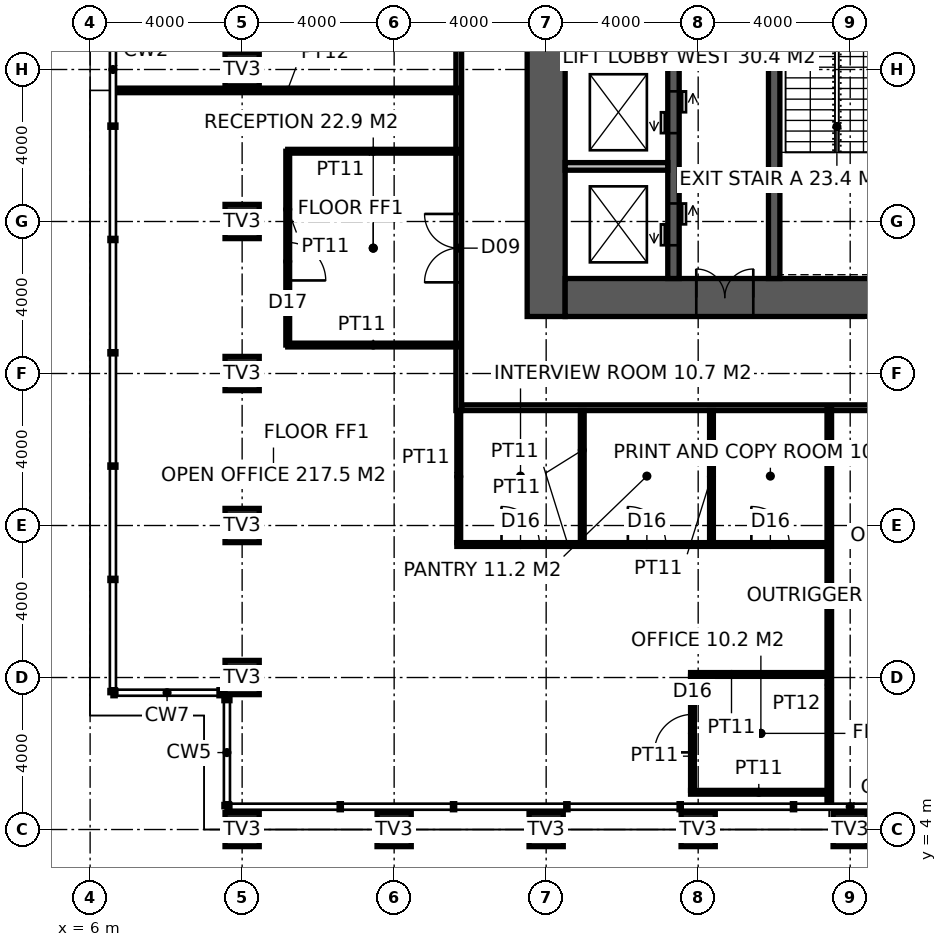
"""IFC4 building model, lengths in metres.
Left out: names, types, materials, properties, quantities, classifications, styles, units other than length and angle.
Written with IfcOpenShell. Run it as: python <this file> out.ifc"""

import sys

from ifc_helpers import new_model, si_unit, direction, frame, frame_2d, origin, origin_2d, place, context, subcontext, project, spatial, rectangle, hollow_rectangle, extrude, element, fill, save


model = new_model("IFC4")
c1 = context("Model", 3, precision=1e-05, world=origin(), true_north=direction((0.0, 1.0)))
c2 = subcontext(c1, "Body", "Model", "MODEL_VIEW")
j1 = project(units=[si_unit("LENGTHUNIT", "METRE"), si_unit("PLANEANGLEUNIT", "RADIAN")], contexts=[c1])
p1 = place(None, origin())
s1 = spatial("IfcSite", under=j1, at=p1, CompositionType="ELEMENT")
p2 = place(p1, origin())
s2 = spatial("IfcBuilding", under=s1, at=p2, CompositionType="ELEMENT")
p3 = place(p2, frame((0.0, 0.0, 270.2)))
s3 = spatial("IfcBuildingStorey", under=s2, at=p3, CompositionType="ELEMENT", Elevation=270.2)
for number, where, z_axis, x_axis in (
    (1, (10.0, 4.0, 0.0), (0.0, 0.0, 1.0), (1.0, 0.0, 0.0)),
    (2, (14.0, 4.0, 0.0), (0.0, 0.0, 1.0), (1.0, 0.0, 0.0)),
    (3, (18.0, 4.0, 0.0), (0.0, 0.0, 1.0), (1.0, 0.0, 0.0)),
    (4, (22.0, 4.0, 0.0), (0.0, 0.0, 1.0), (1.0, 0.0, 0.0)),
    (5, (26.0, 4.0, 0.0), (0.0, 0.0, 1.0), (1.0, 0.0, 0.0)),
    (6, (10.0, 8.0, 0.0), (0.0, 0.0, 1.0), (1.0, 0.0, 0.0)),
    (7, (10.0, 12.0, 0.0), (0.0, 0.0, 1.0), (1.0, 0.0, 0.0)),
    (8, (10.0, 16.0, 0.0), (0.0, 0.0, 1.0), (1.0, 0.0, 0.0)),
    (9, (10.0, 20.0, 0.0), (0.0, 0.0, 1.0), (1.0, 0.0, 0.0)),
    (10, (10.0, 24.0, 0.0), (0.0, 0.0, 1.0), (1.0, 0.0, 0.0)),
):
    element("IfcColumn", number, at=place(p3, frame(where, z_axis=z_axis, x_axis=x_axis)), inside=s3, PredefinedType="USERDEFINED", context=c2, shape_type="SweptSolid", body=[
        extrude(hollow_rectangle(XDim=0.9, YDim=0.9, WallThickness=0.08, at=origin_2d()), origin(), (0.0, 0.0, 1.0), 4.0),
    ])
p4 = place(p3, frame((18.0, 17.5, -0.15), z_axis=(0.0, 0.0, 1.0), x_axis=(0.0, 1.0, 0.0)))
e11 = element("IfcWall", 11, at=p4, inside=s3, PredefinedType="SHEAR", context=c2, shape_type="SweptSolid", body=[
    extrude(rectangle(XDim=19.0, YDim=1.0, at=frame_2d((9.5, 0.0))), origin(), (0.0, 0.0, 1.0), 4.0),
])
p5 = place(p3, frame((18.5, 18.0, -0.15), z_axis=(0.0, 0.0, 1.0), x_axis=(1.0, 0.0, 0.0)))
e12 = element("IfcWall", 12, at=p5, inside=s3, PredefinedType="SHEAR", context=c2, shape_type="SweptSolid", body=[
    extrude(rectangle(XDim=17.6, YDim=1.0, at=frame_2d((8.8, 0.0))), origin(), (0.0, 0.0, 1.0), 4.0),
])
p6 = place(p5, frame((3.45, 0.0, 0.15)))
e13 = element("IfcOpeningElement", 13, at=p6, cuts=e12, PredefinedType="OPENING", context=c2, shape_type="SweptSolid", body=[
    extrude(rectangle(XDim=1.5, YDim=2.4, at=frame_2d((0.75, 1.2))), frame((0.0, 0.51, 0.0), z_axis=(0.0, -1.0, 0.0), x_axis=(1.0, 0.0, 0.0)), (0.0, 0.0, 1.0), 1.02),
])
p7 = place(p3, frame((24.0, 18.5, -0.15), z_axis=(0.0, 0.0, 1.0), x_axis=(0.0, 1.0, 0.0)))
e14 = element("IfcWall", 14, at=p7, inside=s3, PredefinedType="SHEAR", context=c2, shape_type="SweptSolid", body=[
    extrude(rectangle(XDim=17.0, YDim=0.3, at=frame_2d((8.5, 0.0))), origin(), (0.0, 0.0, 1.0), 4.0),
])
p8 = place(p7, frame((9.6, 0.0, 0.15)))
e15 = element("IfcOpeningElement", 15, at=p8, cuts=e14, PredefinedType="OPENING", context=c2, shape_type="SweptSolid", body=[
    extrude(rectangle(XDim=1.5, YDim=2.4, at=frame_2d((0.75, 1.2))), frame((0.0, 0.16, 0.0), z_axis=(0.0, -1.0, 0.0), x_axis=(1.0, 0.0, 0.0)), (0.0, 0.0, 1.0), 0.32),
])
p9 = place(p3, frame((21.35, 18.5, -0.15), z_axis=(0.0, 0.0, 1.0), x_axis=(0.0, 1.0, 0.0)))
e16 = element("IfcWall", 16, at=p9, inside=s3, PredefinedType="SHEAR", context=c2, shape_type="SweptSolid", body=[
    extrude(rectangle(XDim=12.5, YDim=0.3, at=frame_2d((6.25, 0.0))), origin(), (0.0, 0.0, 1.0), 4.0),
])
p10 = place(p9, frame((0.875, 0.0, 0.15)))
e17 = element("IfcOpeningElement", 17, at=p10, cuts=e16, PredefinedType="OPENING", context=c2, shape_type="SweptSolid", body=[
    extrude(rectangle(XDim=1.1, YDim=2.2, at=frame_2d((0.55, 1.1))), frame((0.0, 0.16, 0.0), z_axis=(0.0, -1.0, 0.0), x_axis=(1.0, 0.0, 0.0)), (0.0, 0.0, 1.0), 0.32),
])
p11 = place(p9, frame((3.825, 0.0, 0.15)))
e18 = element("IfcOpeningElement", 18, at=p11, cuts=e16, PredefinedType="OPENING", context=c2, shape_type="SweptSolid", body=[
    extrude(rectangle(XDim=1.1, YDim=2.2, at=frame_2d((0.55, 1.1))), frame((0.0, 0.16, 0.0), z_axis=(0.0, -1.0, 0.0), x_axis=(1.0, 0.0, 0.0)), (0.0, 0.0, 1.0), 0.32),
])
p12 = place(p9, frame((6.675, 0.0, 0.15)))
e19 = element("IfcOpeningElement", 19, at=p12, cuts=e16, PredefinedType="OPENING", context=c2, shape_type="SweptSolid", body=[
    extrude(rectangle(XDim=1.1, YDim=2.2, at=frame_2d((0.55, 1.1))), frame((0.0, 0.16, 0.0), z_axis=(0.0, -1.0, 0.0), x_axis=(1.0, 0.0, 0.0)), (0.0, 0.0, 1.0), 0.32),
])
p13 = place(p9, frame((9.575, 0.0, 0.15)))
e20 = element("IfcOpeningElement", 20, at=p13, cuts=e16, PredefinedType="OPENING", context=c2, shape_type="SweptSolid", body=[
    extrude(rectangle(XDim=1.1, YDim=2.2, at=frame_2d((0.55, 1.1))), frame((0.0, 0.16, 0.0), z_axis=(0.0, -1.0, 0.0), x_axis=(1.0, 0.0, 0.0)), (0.0, 0.0, 1.0), 0.32),
])
for number, where, z_axis, x_axis in (
    (21, (18.5, 21.45, -0.15), (0.0, 0.0, 1.0), (1.0, 0.0, 0.0)),
    (22, (18.5, 24.3, -0.15), (0.0, 0.0, 1.0), (1.0, 0.0, 0.0)),
):
    element("IfcWall", number, at=place(p3, frame(where, z_axis=z_axis, x_axis=x_axis)), inside=s3, PredefinedType="SOLIDWALL", context=c2, shape_type="SweptSolid", body=[
        extrude(rectangle(XDim=2.7, YDim=0.2, at=frame_2d((1.35, 0.0))), origin(), (0.0, 0.0, 1.0), 4.0),
    ])
p14 = place(p3, frame((15.7, 15.025, 0.0), z_axis=(0.0, 0.0, 1.0), x_axis=(0.0, 1.0, 0.0)))
e23 = element("IfcWall", 23, at=p14, inside=s3, PredefinedType="PARTITIONING", context=c2, shape_type="SweptSolid", body=[
    extrude(rectangle(XDim=23.35, YDim=0.15, at=frame_2d((11.675, 0.0))), origin(), (0.0, 0.0, 1.0), 3.85),
])
p15 = place(p14, frame((3.374, 0.0, 0.0)))
e24 = element("IfcOpeningElement", 24, at=p15, cuts=e23, PredefinedType="OPENING", context=c2, shape_type="SweptSolid", body=[
    extrude(rectangle(XDim=1.8, YDim=2.4, at=frame_2d((0.9, 1.2))), frame((0.0, 0.085, 0.0), z_axis=(0.0, -1.0, 0.0), x_axis=(1.0, 0.0, 0.0)), (0.0, 0.0, 1.0), 0.17),
])
p16 = place(p14, frame((17.476, 0.0, 0.0)))
e25 = element("IfcOpeningElement", 25, at=p16, cuts=e23, PredefinedType="OPENING", context=c2, shape_type="SweptSolid", body=[
    extrude(rectangle(XDim=1.8, YDim=2.4, at=frame_2d((0.9, 1.2))), frame((0.0, 0.085, 0.0), z_axis=(0.0, -1.0, 0.0), x_axis=(1.0, 0.0, 0.0)), (0.0, 0.0, 1.0), 0.17),
])
p17 = place(p14, frame((10.475, 0.0, 0.0)))
e26 = element("IfcOpeningElement", 26, at=p17, cuts=e23, PredefinedType="OPENING", context=c2, shape_type="SweptSolid", body=[
    extrude(rectangle(XDim=1.0, YDim=2.2, at=frame_2d((0.5, 1.1))), frame((0.0, 0.085, 0.0), z_axis=(0.0, -1.0, 0.0), x_axis=(1.0, 0.0, 0.0)), (0.0, 0.0, 1.0), 0.17),
])
p18 = place(p3, frame((15.775, 15.1, 0.0), z_axis=(0.0, 0.0, 1.0), x_axis=(1.0, 0.0, 0.0)))
e27 = element("IfcWall", 27, at=p18, inside=s3, PredefinedType="PARTITIONING", context=c2, shape_type="SweptSolid", body=[
    extrude(rectangle(XDim=22.65, YDim=0.15, at=frame_2d((11.325, 0.0))), origin(), (0.0, 0.0, 1.0), 3.85),
])
p19 = place(p18, frame((11.725, 0.0, 0.0)))
e28 = element("IfcOpeningElement", 28, at=p19, cuts=e27, PredefinedType="OPENING", context=c2, shape_type="SweptSolid", body=[
    extrude(rectangle(XDim=1.0, YDim=2.2, at=frame_2d((0.5, 1.1))), frame((0.0, 0.085, 0.0), z_axis=(0.0, -1.0, 0.0), x_axis=(1.0, 0.0, 0.0)), (0.0, 0.0, 1.0), 0.17),
])
p20 = place(p3, frame((25.45, 4.68, 0.0), z_axis=(0.0, 0.0, 1.0), x_axis=(0.0, 1.0, 0.0)))
e29 = element("IfcWall", 29, at=p20, inside=s3, PredefinedType="PARTITIONING", context=c2, shape_type="SweptSolid", body=[
    extrude(rectangle(XDim=10.42, YDim=0.12, at=frame_2d((5.21, 0.0))), origin(), (0.0, 0.0, 1.0), 2.65),
])
p21 = place(p3, frame((6.68, 23.45, 0.0), z_axis=(0.0, 0.0, 1.0), x_axis=(1.0, 0.0, 0.0)))
e30 = element("IfcWall", 30, at=p21, inside=s3, PredefinedType="PARTITIONING", context=c2, shape_type="SweptSolid", body=[
    extrude(rectangle(XDim=9.02, YDim=0.12, at=frame_2d((4.51, 0.0))), origin(), (0.0, 0.0, 1.0), 3.85),
])
for number, where, z_axis, x_axis in (
    (31, (21.8, 4.98, 0.0), (0.0, 0.0, 1.0), (1.0, 0.0, 0.0)),
    (32, (21.8, 8.08, 0.0), (0.0, 0.0, 1.0), (1.0, 0.0, 0.0)),
):
    element("IfcWall", number, at=place(p3, frame(where, z_axis=z_axis, x_axis=x_axis)), inside=s3, PredefinedType="PARTITIONING", context=c2, shape_type="SweptSolid", body=[
        extrude(rectangle(XDim=3.59, YDim=0.1, at=frame_2d((1.795, 0.0))), origin(), (0.0, 0.0, 1.0), 3.85),
    ])
p22 = place(p3, frame((15.65, 11.5, 0.0), z_axis=(0.0, 0.0, 1.0), x_axis=(1.0, 0.0, 0.0)))
e33 = element("IfcWall", 33, at=p22, inside=s3, PredefinedType="PARTITIONING", context=c2, shape_type="SweptSolid", body=[
    extrude(rectangle(XDim=9.739, YDim=0.1, at=frame_2d((4.87, 0.0))), origin(), (0.0, 0.0, 1.0), 3.85),
])
p23 = place(p22, frame((1.175, 0.0, 0.0)))
e34 = element("IfcOpeningElement", 34, at=p23, cuts=e33, PredefinedType="OPENING", context=c2, shape_type="SweptSolid", body=[
    extrude(rectangle(XDim=1.0, YDim=2.2, at=frame_2d((0.5, 1.1))), frame((0.0, 0.06, 0.0), z_axis=(0.0, -1.0, 0.0), x_axis=(1.0, 0.0, 0.0)), (0.0, 0.0, 1.0), 0.12),
])
p24 = place(p22, frame((4.5, 0.0, 0.0)))
e35 = element("IfcOpeningElement", 35, at=p24, cuts=e33, PredefinedType="OPENING", context=c2, shape_type="SweptSolid", body=[
    extrude(rectangle(XDim=1.0, YDim=2.2, at=frame_2d((0.5, 1.1))), frame((0.0, 0.06, 0.0), z_axis=(0.0, -1.0, 0.0), x_axis=(1.0, 0.0, 0.0)), (0.0, 0.0, 1.0), 0.12),
])
p25 = place(p22, frame((7.75, 0.0, 0.0)))
e36 = element("IfcOpeningElement", 36, at=p25, cuts=e33, PredefinedType="OPENING", context=c2, shape_type="SweptSolid", body=[
    extrude(rectangle(XDim=1.0, YDim=2.2, at=frame_2d((0.5, 1.1))), frame((0.0, 0.06, 0.0), z_axis=(0.0, -1.0, 0.0), x_axis=(1.0, 0.0, 0.0)), (0.0, 0.0, 1.0), 0.12),
])
for number, where, z_axis, x_axis in (
    (37, (15.7, 11.55, 0.0), (0.0, 0.0, 1.0), (0.0, 1.0, 0.0)),
    (38, (18.95, 11.55, 0.0), (0.0, 0.0, 1.0), (0.0, 1.0, 0.0)),
):
    element("IfcWall", number, at=place(p3, frame(where, z_axis=z_axis, x_axis=x_axis)), inside=s3, PredefinedType="PARTITIONING", context=c2, shape_type="SweptSolid", body=[
        extrude(rectangle(XDim=3.475, YDim=0.1, at=frame_2d((1.737, 0.0))), origin(), (0.0, 0.0, 1.0), 3.85),
    ])
p26 = place(p3, frame((21.85, 5.03, 0.0), z_axis=(0.0, 0.0, 1.0), x_axis=(0.0, 1.0, 0.0)))
e39 = element("IfcWall", 39, at=p26, inside=s3, PredefinedType="PARTITIONING", context=c2, shape_type="SweptSolid", body=[
    extrude(rectangle(XDim=3.0, YDim=0.1, at=frame_2d((1.5, 0.0))), origin(), (0.0, 0.0, 1.0), 2.95),
])
p27 = place(p26, frame((1.0, 0.0, 0.0)))
e40 = element("IfcOpeningElement", 40, at=p27, cuts=e39, PredefinedType="OPENING", context=c2, shape_type="SweptSolid", body=[
    extrude(rectangle(XDim=1.0, YDim=2.2, at=frame_2d((0.5, 1.1))), frame((0.0, 0.06, 0.0), z_axis=(0.0, -1.0, 0.0), x_axis=(1.0, 0.0, 0.0)), (0.0, 0.0, 1.0), 0.12),
])
p28 = place(p3, frame((22.35, 11.55, 0.0), z_axis=(0.0, 0.0, 1.0), x_axis=(0.0, 1.0, 0.0)))
e41 = element("IfcWall", 41, at=p28, inside=s3, PredefinedType="PARTITIONING", context=c2, shape_type="SweptSolid", body=[
    extrude(rectangle(XDim=3.475, YDim=0.1, at=frame_2d((1.737, 0.0))), origin(), (0.0, 0.0, 1.0), 3.85),
])
p29 = place(p3, frame((15.7, 21.849, 0.0), z_axis=(0.0, 0.0, 1.0), x_axis=(-1.0, 0.0, 0.0)))
e42 = element("IfcWall", 42, at=p29, inside=s3, PredefinedType="PARTITIONING", context=c2, shape_type="SweptSolid", body=[
    extrude(rectangle(XDim=4.5, YDim=0.1, at=frame_2d((2.25, 0.0))), origin(), (0.0, 0.0, 1.0), 3.85),
])
p30 = place(p3, frame((11.2, 21.849, 0.0), z_axis=(0.0, 0.0, 1.0), x_axis=(0.0, -1.0, 0.0)))
e43 = element("IfcWall", 43, at=p30, inside=s3, PredefinedType="PARTITIONING", context=c2, shape_type="SweptSolid", body=[
    extrude(rectangle(XDim=5.1, YDim=0.1, at=frame_2d((2.55, 0.0))), origin(), (0.0, 0.0, 1.0), 3.85),
])
p31 = place(p30, frame((2.4, 0.0, 0.0)))
e44 = element("IfcOpeningElement", 44, at=p31, cuts=e43, PredefinedType="OPENING", context=c2, shape_type="SweptSolid", body=[
    extrude(rectangle(XDim=1.0, YDim=2.2, at=frame_2d((0.5, 1.1))), frame((0.0, 0.06, 0.0), z_axis=(0.0, -1.0, 0.0), x_axis=(1.0, 0.0, 0.0)), (0.0, 0.0, 1.0), 0.12),
])
p32 = place(p3, frame((11.2, 16.749, 0.0), z_axis=(0.0, 0.0, 1.0), x_axis=(1.0, 0.0, 0.0)))
e45 = element("IfcWall", 45, at=p32, inside=s3, PredefinedType="PARTITIONING", context=c2, shape_type="SweptSolid", body=[
    extrude(rectangle(XDim=4.5, YDim=0.1, at=frame_2d((2.25, 0.0))), origin(), (0.0, 0.0, 1.0), 3.85),
])
p33 = place(p6, origin())
e46 = element("IfcDoor", 46, at=p33, inside=s3, OperationType="DOUBLE_DOOR_DOUBLE_SWING", PredefinedType="DOOR", context=c2, shape_type="SweptSolid", body=[
    extrude(rectangle(XDim=1.5, YDim=2.4, at=frame_2d((0.75, 1.2))), frame((0.0, 0.025, 0.0), z_axis=(0.0, -1.0, 0.0), x_axis=(1.0, 0.0, 0.0)), (0.0, 0.0, 1.0), 0.05),
])
fill(e13, e46)
p34 = place(p15, origin())
e47 = element("IfcDoor", 47, at=p34, inside=s3, OperationType="DOUBLE_DOOR_DOUBLE_SWING", PredefinedType="DOOR", context=c2, shape_type="SweptSolid", body=[
    extrude(rectangle(XDim=1.8, YDim=2.4, at=frame_2d((0.9, 1.2))), frame((0.0, 0.025, 0.0), z_axis=(0.0, -1.0, 0.0), x_axis=(1.0, 0.0, 0.0)), (0.0, 0.0, 1.0), 0.05),
])
fill(e24, e47)
p35 = place(p23, origin())
e48 = element("IfcDoor", 48, at=p35, inside=s3, OperationType="SINGLE_SWING_LEFT", PredefinedType="DOOR", context=c2, shape_type="SweptSolid", body=[
    extrude(rectangle(XDim=1.0, YDim=2.2, at=frame_2d((0.5, 1.1))), frame((0.0, 0.025, 0.0), z_axis=(0.0, -1.0, 0.0), x_axis=(1.0, 0.0, 0.0)), (0.0, 0.0, 1.0), 0.05),
])
fill(e34, e48)
p36 = place(p24, origin())
e49 = element("IfcDoor", 49, at=p36, inside=s3, OperationType="SINGLE_SWING_LEFT", PredefinedType="DOOR", context=c2, shape_type="SweptSolid", body=[
    extrude(rectangle(XDim=1.0, YDim=2.2, at=frame_2d((0.5, 1.1))), frame((0.0, 0.025, 0.0), z_axis=(0.0, -1.0, 0.0), x_axis=(1.0, 0.0, 0.0)), (0.0, 0.0, 1.0), 0.05),
])
fill(e35, e49)
p37 = place(p25, origin())
e50 = element("IfcDoor", 50, at=p37, inside=s3, OperationType="SINGLE_SWING_LEFT", PredefinedType="DOOR", context=c2, shape_type="SweptSolid", body=[
    extrude(rectangle(XDim=1.0, YDim=2.2, at=frame_2d((0.5, 1.1))), frame((0.0, 0.025, 0.0), z_axis=(0.0, -1.0, 0.0), x_axis=(1.0, 0.0, 0.0)), (0.0, 0.0, 1.0), 0.05),
])
fill(e36, e50)
p38 = place(p27, origin())
e51 = element("IfcDoor", 51, at=p38, inside=s3, OperationType="SINGLE_SWING_LEFT", PredefinedType="DOOR", context=c2, shape_type="SweptSolid", body=[
    extrude(rectangle(XDim=1.0, YDim=2.2, at=frame_2d((0.5, 1.1))), frame((0.0, 0.025, 0.0), z_axis=(0.0, -1.0, 0.0), x_axis=(1.0, 0.0, 0.0)), (0.0, 0.0, 1.0), 0.05),
])
fill(e40, e51)
p39 = place(p31, origin())
e52 = element("IfcDoor", 52, at=p39, inside=s3, OperationType="SINGLE_SWING_RIGHT", PredefinedType="DOOR", context=c2, shape_type="SweptSolid", body=[
    extrude(rectangle(XDim=1.0, YDim=2.2, at=frame_2d((0.5, 1.1))), frame((0.0, 0.025, 0.0), z_axis=(0.0, -1.0, 0.0), x_axis=(1.0, 0.0, 0.0)), (0.0, 0.0, 1.0), 0.05),
])
fill(e44, e52)
p40 = place(p10, origin())
e53 = element("IfcDoor", 53, at=p40, inside=s3, OperationType="DOUBLE_DOOR_SLIDING", PredefinedType="DOOR", context=c2, shape_type="SweptSolid", body=[
    extrude(rectangle(XDim=1.1, YDim=2.2, at=frame_2d((0.55, 1.1))), frame((0.0, 0.025, 0.0), z_axis=(0.0, -1.0, 0.0), x_axis=(1.0, 0.0, 0.0)), (0.0, 0.0, 1.0), 0.05),
])
fill(e17, e53)
p41 = place(p11, origin())
e54 = element("IfcDoor", 54, at=p41, inside=s3, OperationType="DOUBLE_DOOR_SLIDING", PredefinedType="DOOR", context=c2, shape_type="SweptSolid", body=[
    extrude(rectangle(XDim=1.1, YDim=2.2, at=frame_2d((0.55, 1.1))), frame((0.0, 0.025, 0.0), z_axis=(0.0, -1.0, 0.0), x_axis=(1.0, 0.0, 0.0)), (0.0, 0.0, 1.0), 0.05),
])
fill(e18, e54)
save(model, sys.argv[1])
